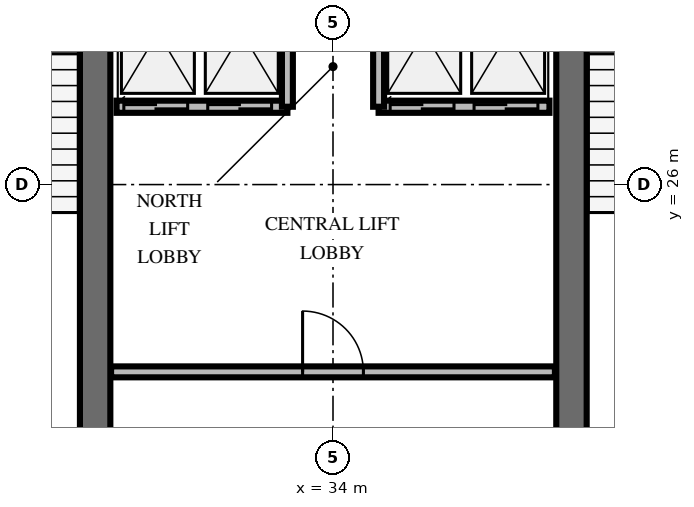
"""IFC4 building model, lengths in metres.
Left out: names, types, materials, properties, quantities, classifications, styles, units other than length and angle.
Written with IfcOpenShell. Run it as: python <this file> out.ifc"""

import sys

from ifc_helpers import new_model, si_unit, direction, frame, frame_2d, origin, place, context, subcontext, project, spatial, rectangle, extrude, element, fill, save


model = new_model("IFC4")
c1 = context("Model", 3, precision=1e-05, world=origin(), true_north=direction((0.0, 1.0)))
c2 = subcontext(c1, "Body", "Model", "MODEL_VIEW")
j1 = project(units=[si_unit("LENGTHUNIT", "METRE"), si_unit("PLANEANGLEUNIT", "RADIAN")], contexts=[c1])
p1 = place(None, origin())
s1 = spatial("IfcSite", under=j1, at=p1, CompositionType="ELEMENT")
p2 = place(p1, origin())
s2 = spatial("IfcBuilding", under=s1, at=p2, CompositionType="ELEMENT")
p3 = place(p2, frame((0.0, 0.0, 252.0)))
s3 = spatial("IfcBuildingStorey", under=s2, at=p3, CompositionType="ELEMENT", Elevation=252.0)
for number, where, z_axis, x_axis in (
    (1, (30.088, 20.262, 0.0), (0.0, 0.0, 1.0), (0.0, 1.0, 0.0)),
    (2, (37.922, 20.262, 0.0), (0.0, 0.0, 1.0), (0.0, 1.0, 0.0)),
):
    element("IfcWall", number, at=place(p3, frame(where, z_axis=z_axis, x_axis=x_axis)), inside=s3, PredefinedType="SHEAR", context=c2, shape_type="SweptSolid", body=[
        extrude(rectangle(XDim=9.676, YDim=0.5, at=frame_2d((4.838, 0.0))), origin(), (0.0, 0.0, 1.0), 3.6),
    ])
p4 = place(p3, frame((30.35, 22.92, 0.0), z_axis=(0.0, 0.0, 1.0), x_axis=(1.0, 0.0, 0.0)))
e3 = element("IfcWall", 3, at=p4, inside=s3, PredefinedType="PARTITIONING", context=c2, shape_type="SweptSolid", body=[
    extrude(rectangle(XDim=7.3, YDim=0.18, at=frame_2d((3.65, 0.0))), origin(), (0.0, 0.0, 1.0), 2.46),
])
p5 = place(p4, frame((3.15, 0.0, 0.0)))
e4 = element("IfcOpeningElement", 4, at=p5, cuts=e3, PredefinedType="OPENING", context=c2, shape_type="SweptSolid", body=[
    extrude(rectangle(XDim=1.0, YDim=2.15, at=frame_2d((0.5, 1.075))), frame((0.0, 0.1, 0.0), z_axis=(0.0, -1.0, 0.0), x_axis=(1.0, 0.0, 0.0)), (0.0, 0.0, 1.0), 0.2),
])
p6 = place(p3, frame((30.44, 27.28, 0.0), z_axis=(0.0, 0.0, 1.0), x_axis=(1.0, 0.0, 0.0)))
e5 = element("IfcWall", 5, at=p6, inside=s3, PredefinedType="SOLIDWALL", context=c2, shape_type="SweptSolid", body=[
    extrude(rectangle(XDim=2.81, YDim=0.2, at=frame_2d((1.405, 0.0))), origin(), (0.0, 0.0, 1.0), 2.46),
])
p7 = place(p6, frame((0.12, 0.0, 0.0)))
e6 = element("IfcOpeningElement", 6, at=p7, cuts=e5, PredefinedType="OPENING", context=c2, shape_type="SweptSolid", body=[
    extrude(rectangle(XDim=1.05, YDim=2.1, at=frame_2d((0.525, 1.05))), frame((0.0, 0.11, 0.0), z_axis=(0.0, -1.0, 0.0), x_axis=(1.0, 0.0, 0.0)), (0.0, 0.0, 1.0), 0.22),
])
p8 = place(p6, frame((1.5, 0.0, 0.0)))
e7 = element("IfcOpeningElement", 7, at=p8, cuts=e5, PredefinedType="OPENING", context=c2, shape_type="SweptSolid", body=[
    extrude(rectangle(XDim=1.05, YDim=2.1, at=frame_2d((0.525, 1.05))), frame((0.0, 0.11, 0.0), z_axis=(0.0, -1.0, 0.0), x_axis=(1.0, 0.0, 0.0)), (0.0, 0.0, 1.0), 0.22),
])
p9 = place(p3, frame((33.25, 27.28, 0.0), z_axis=(0.0, 0.0, 1.0), x_axis=(0.0, 1.0, 0.0)))
e8 = element("IfcWall", 8, at=p9, inside=s3, PredefinedType="SOLIDWALL", context=c2, shape_type="SweptSolid", body=[
    extrude(rectangle(XDim=2.47, YDim=0.18, at=frame_2d((1.235, 0.0))), origin(), (0.0, 0.0, 1.0), 2.46),
])
p10 = place(p3, frame((34.75, 27.28, 0.0), z_axis=(0.0, 0.0, 1.0), x_axis=(1.0, 0.0, 0.0)))
e9 = element("IfcWall", 9, at=p10, inside=s3, PredefinedType="SOLIDWALL", context=c2, shape_type="SweptSolid", body=[
    extrude(rectangle(XDim=2.81, YDim=0.2, at=frame_2d((1.405, 0.0))), origin(), (0.0, 0.0, 1.0), 2.46),
])
p11 = place(p10, frame((0.19, 0.0, 0.0)))
e10 = element("IfcOpeningElement", 10, at=p11, cuts=e9, PredefinedType="OPENING", context=c2, shape_type="SweptSolid", body=[
    extrude(rectangle(XDim=1.05, YDim=2.1, at=frame_2d((0.525, 1.05))), frame((0.0, 0.11, 0.0), z_axis=(0.0, -1.0, 0.0), x_axis=(1.0, 0.0, 0.0)), (0.0, 0.0, 1.0), 0.22),
])
p12 = place(p10, frame((1.57, 0.0, 0.0)))
e11 = element("IfcOpeningElement", 11, at=p12, cuts=e9, PredefinedType="OPENING", context=c2, shape_type="SweptSolid", body=[
    extrude(rectangle(XDim=1.05, YDim=2.1, at=frame_2d((0.525, 1.05))), frame((0.0, 0.11, 0.0), z_axis=(0.0, -1.0, 0.0), x_axis=(1.0, 0.0, 0.0)), (0.0, 0.0, 1.0), 0.22),
])
p13 = place(p3, frame((34.75, 27.28, 0.0), z_axis=(0.0, 0.0, 1.0), x_axis=(0.0, 1.0, 0.0)))
e12 = element("IfcWall", 12, at=p13, inside=s3, PredefinedType="SOLIDWALL", context=c2, shape_type="SweptSolid", body=[
    extrude(rectangle(XDim=2.47, YDim=0.18, at=frame_2d((1.235, 0.0))), origin(), (0.0, 0.0, 1.0), 2.46),
])
p14 = place(p5, origin())
e13 = element("IfcDoor", 13, at=p14, inside=s3, OperationType="SINGLE_SWING_LEFT", PredefinedType="DOOR", context=c2, shape_type="SweptSolid", body=[
    extrude(rectangle(XDim=1.0, YDim=2.15, at=frame_2d((0.5, 1.075))), frame((0.0, 0.025, 0.0), z_axis=(0.0, -1.0, 0.0), x_axis=(1.0, 0.0, 0.0)), (0.0, 0.0, 1.0), 0.05),
])
fill(e4, e13)
p15 = place(p7, origin())
e14 = element("IfcDoor", 14, at=p15, inside=s3, OperationType="DOUBLE_DOOR_SLIDING", PredefinedType="USERDEFINED", context=c2, shape_type="SweptSolid", body=[
    extrude(rectangle(XDim=1.05, YDim=2.1, at=frame_2d((0.525, 1.05))), frame((0.0, 0.025, 0.0), z_axis=(0.0, -1.0, 0.0), x_axis=(1.0, 0.0, 0.0)), (0.0, 0.0, 1.0), 0.05),
])
fill(e6, e14)
p16 = place(p8, origin())
e15 = element("IfcDoor", 15, at=p16, inside=s3, OperationType="DOUBLE_DOOR_SLIDING", PredefinedType="USERDEFINED", context=c2, shape_type="SweptSolid", body=[
    extrude(rectangle(XDim=1.05, YDim=2.1, at=frame_2d((0.525, 1.05))), frame((0.0, 0.025, 0.0), z_axis=(0.0, -1.0, 0.0), x_axis=(1.0, 0.0, 0.0)), (0.0, 0.0, 1.0), 0.05),
])
fill(e7, e15)
p17 = place(p11, origin())
e16 = element("IfcDoor", 16, at=p17, inside=s3, OperationType="DOUBLE_DOOR_SLIDING", PredefinedType="USERDEFINED", context=c2, shape_type="SweptSolid", body=[
    extrude(rectangle(XDim=1.05, YDim=2.1, at=frame_2d((0.525, 1.05))), frame((0.0, 0.025, 0.0), z_axis=(0.0, -1.0, 0.0), x_axis=(1.0, 0.0, 0.0)), (0.0, 0.0, 1.0), 0.05),
])
fill(e10, e16)
p18 = place(p12, origin())
e17 = element("IfcDoor", 17, at=p18, inside=s3, OperationType="DOUBLE_DOOR_SLIDING", PredefinedType="USERDEFINED", context=c2, shape_type="SweptSolid", body=[
    extrude(rectangle(XDim=1.05, YDim=2.1, at=frame_2d((0.525, 1.05))), frame((0.0, 0.025, 0.0), z_axis=(0.0, -1.0, 0.0), x_axis=(1.0, 0.0, 0.0)), (0.0, 0.0, 1.0), 0.05),
])
fill(e11, e17)
save(model, sys.argv[1])
